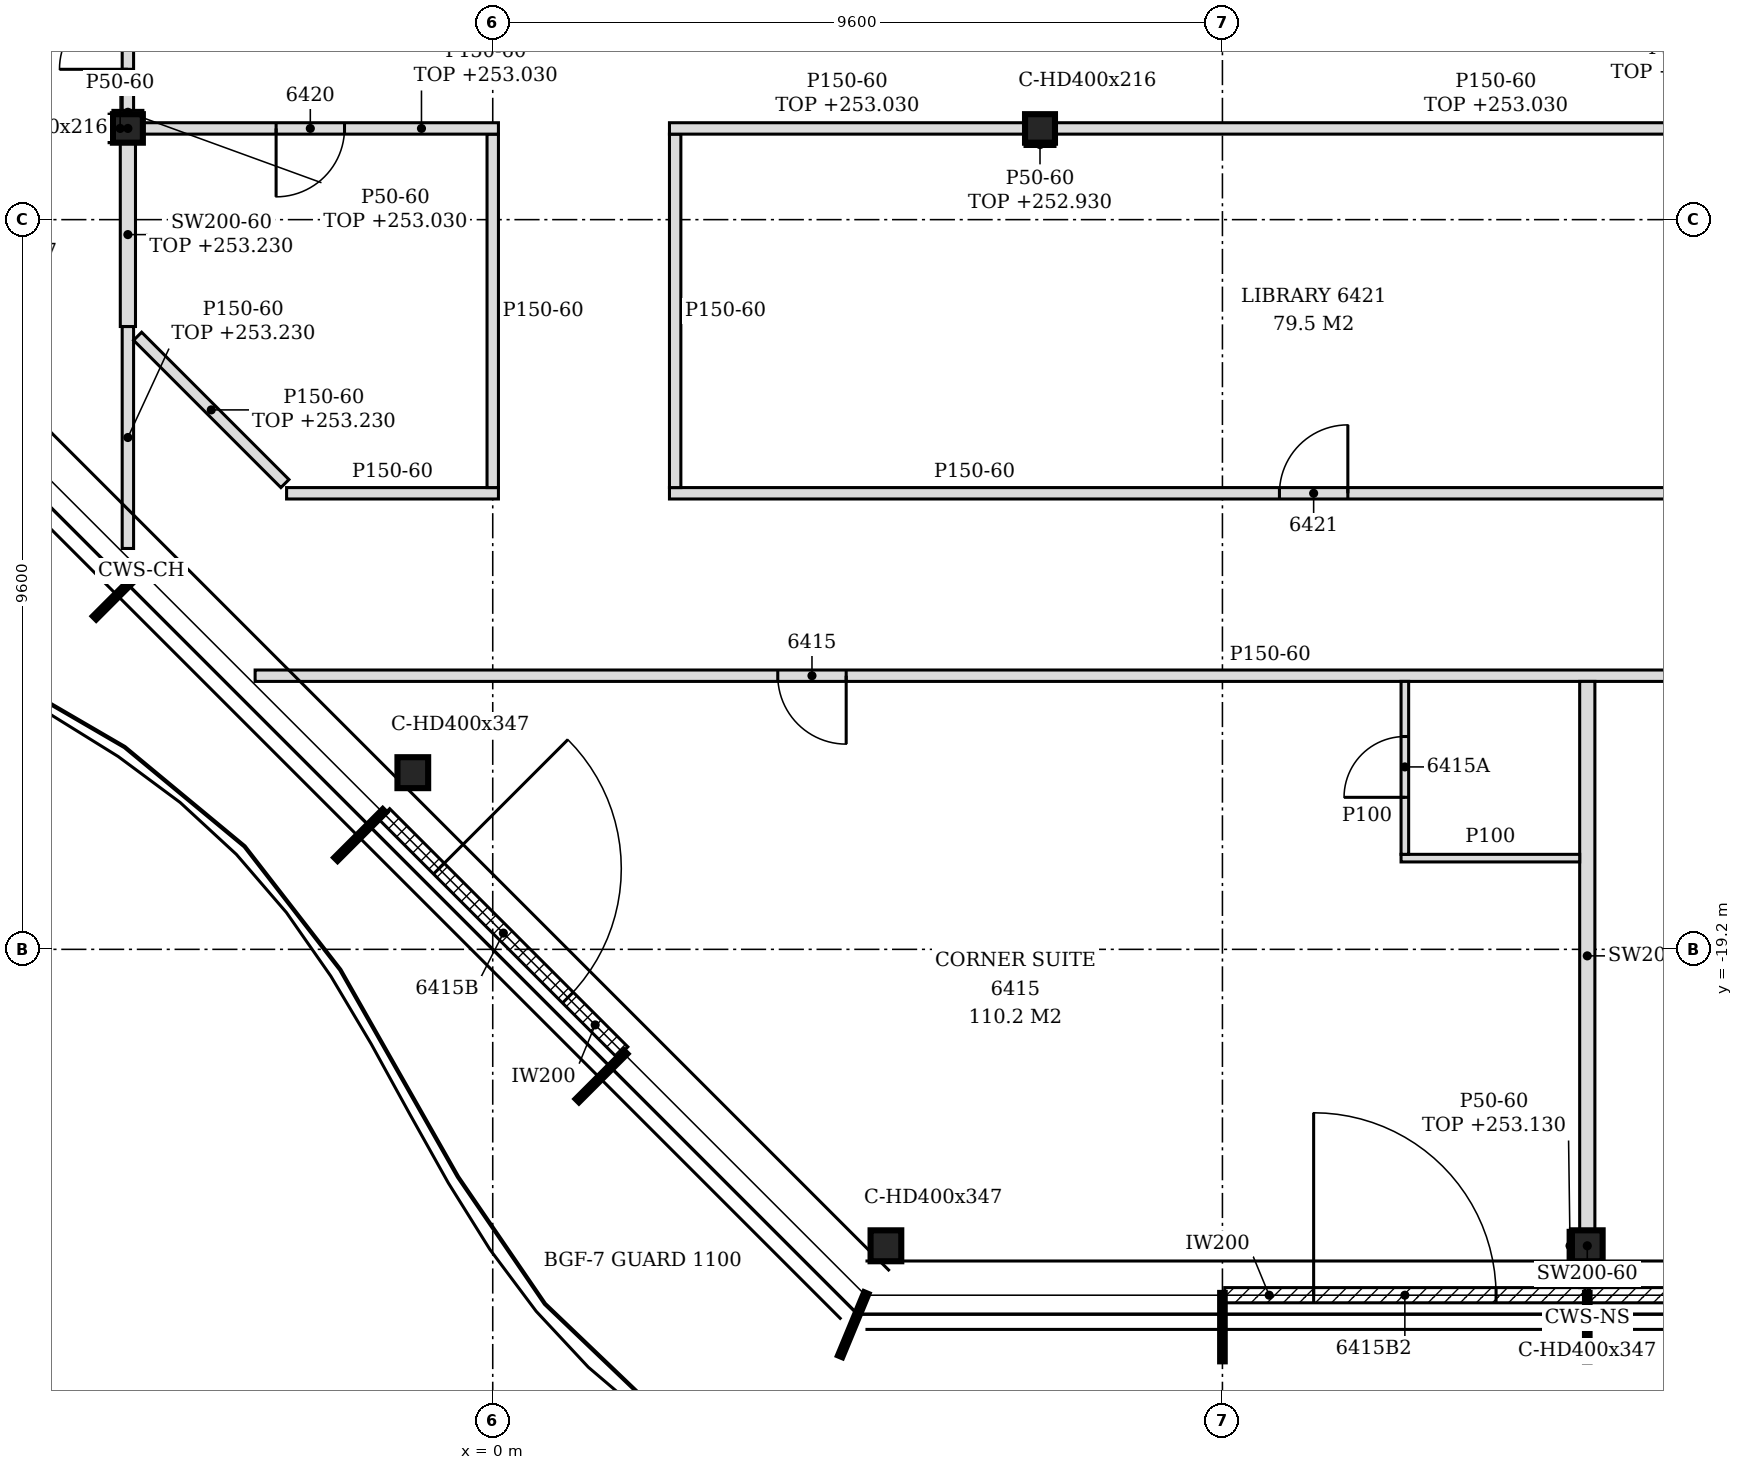
"""IFC4 building model, lengths in metres.
Left out: names, types, materials, properties, quantities, classifications, styles, units other than length and angle.
Written with IfcOpenShell. Run it as: python <this file> out.ifc"""

import sys

from ifc_helpers import new_model, si_unit, direction, frame, frame_2d, origin, origin_2d, place, context, subcontext, project, spatial, polyline, rectangle, i_section, outline, extrude, element, fill, save


model = new_model("IFC4")
c1 = context("Model", 3, precision=1e-05, world=origin(), true_north=direction((0.0, 1.0)))
c2 = subcontext(c1, "Body", "Model", "MODEL_VIEW")
j1 = project(units=[si_unit("LENGTHUNIT", "METRE"), si_unit("PLANEANGLEUNIT", "RADIAN")], contexts=[c1])
p1 = place(None, origin())
s1 = spatial("IfcSite", under=j1, at=p1, CompositionType="ELEMENT")
p2 = place(p1, origin())
s2 = spatial("IfcBuilding", under=s1, at=p2, CompositionType="ELEMENT")
p3 = place(p2, frame((0.0, 0.0, 250.2)))
s3 = spatial("IfcBuildingStorey", under=s2, at=p3, CompositionType="ELEMENT", Elevation=250.2)
for number, where, z_axis, x_axis in (
    (1, (5.173, -23.1, -0.15), (0.0, 0.0, 1.0), (1.0, 0.0, 0.0)),
    (2, (14.4, -23.1, -0.15), (0.0, 0.0, 1.0), (1.0, 0.0, 0.0)),
    (3, (-1.052, -16.876, -0.15), (0.0, 0.0, 1.0), (1.0, 0.0, 0.0)),
):
    element("IfcColumn", number, at=place(p3, frame(where, z_axis=z_axis, x_axis=x_axis)), inside=s3, PredefinedType="COLUMN", context=c2, shape_type="SweptSolid", body=[
        extrude(i_section(OverallWidth=0.404, OverallDepth=0.407, WebThickness=0.027, FlangeThickness=0.044, FilletRadius=0.015, at=origin_2d()), origin(), (0.0, 0.0, 1.0), 3.6),
    ])
for number, where, z_axis, x_axis in (
    (4, (-4.8, -8.4, -0.15), (0.0, 0.0, 1.0), (1.0, 0.0, 0.0)),
    (5, (7.2, -8.4, -0.15), (0.0, 0.0, 1.0), (1.0, 0.0, 0.0)),
):
    element("IfcColumn", number, at=place(p3, frame(where, z_axis=z_axis, x_axis=x_axis)), inside=s3, PredefinedType="COLUMN", context=c2, shape_type="SweptSolid", body=[
        extrude(i_section(OverallWidth=0.394, OverallDepth=0.375, WebThickness=0.017, FlangeThickness=0.028, FilletRadius=0.015, at=origin_2d()), origin(), (0.0, 0.0, 1.0), 3.6),
    ])
p4 = place(p3, frame((9.63, -23.75, 0.0), z_axis=(0.0, 0.0, 1.0), x_axis=(1.0, 0.0, 0.0)))
e6 = element("IfcWall", 6, at=p4, inside=s3, PredefinedType="NOTDEFINED", context=c2, shape_type="SweptSolid", body=[
    extrude(rectangle(XDim=4.74, YDim=0.2, at=frame_2d((2.37, 0.0))), origin(), (0.0, 0.0, 1.0), 3.45),
])
p5 = place(p4, frame((1.17, 0.0, 0.0)))
e7 = element("IfcOpeningElement", 7, at=p5, cuts=e6, PredefinedType="OPENING", context=c2, shape_type="SweptSolid", body=[
    extrude(rectangle(XDim=2.4, YDim=2.4, at=frame_2d((1.2, 1.2))), frame((0.0, 0.11, 0.0), z_axis=(0.0, -1.0, 0.0), x_axis=(1.0, 0.0, 0.0)), (0.0, 0.0, 1.0), 0.22),
])
p6 = place(p3, frame((14.43, -23.75, 0.0), z_axis=(0.0, 0.0, 1.0), x_axis=(1.0, 0.0, 0.0)))
e8 = element("IfcWall", 8, at=p6, inside=s3, PredefinedType="NOTDEFINED", context=c2, shape_type="SweptSolid", body=[
    extrude(rectangle(XDim=4.74, YDim=0.2, at=frame_2d((2.37, 0.0))), origin(), (0.0, 0.0, 1.0), 3.45),
])
p7 = place(p6, frame((1.17, 0.0, 0.0)))
e9 = element("IfcOpeningElement", 9, at=p7, cuts=e8, PredefinedType="OPENING", context=c2, shape_type="SweptSolid", body=[
    extrude(rectangle(XDim=2.4, YDim=2.4, at=frame_2d((1.2, 1.2))), frame((0.0, 0.11, 0.0), z_axis=(0.0, -1.0, 0.0), x_axis=(1.0, 0.0, 0.0)), (0.0, 0.0, 1.0), 0.22),
])
p8 = place(p3, frame((-1.427, -17.42, 0.0), z_axis=(0.0, 0.0, 1.0), x_axis=(0.707106781187, -0.707106781187, 0.0)))
e10 = element("IfcWall", 10, at=p8, inside=s3, PredefinedType="NOTDEFINED", context=c2, shape_type="SweptSolid", body=[
    extrude(rectangle(XDim=4.431, YDim=0.2, at=frame_2d((2.216, 0.0))), origin(), (0.0, 0.0, 1.0), 3.45),
])
p9 = place(p8, frame((1.015, 0.0, 0.0)))
e11 = element("IfcOpeningElement", 11, at=p9, cuts=e10, PredefinedType="OPENING", context=c2, shape_type="SweptSolid", body=[
    extrude(rectangle(XDim=2.4, YDim=2.4, at=frame_2d((1.2, 1.2))), frame((0.0, 0.11, 0.0), z_axis=(0.0, -1.0, 0.0), x_axis=(1.0, 0.0, 0.0)), (0.0, 0.0, 1.0), 0.22),
])
p10 = place(p3, frame((14.4, -23.65, 0.0), z_axis=(0.0, 0.0, 1.0), x_axis=(0.0, 1.0, 0.0)))
e12 = element("IfcWall", 12, at=p10, inside=s3, PredefinedType="PARTITIONING", context=c2, shape_type="SweptSolid", body=[
    extrude(rectangle(XDim=0.346, YDim=0.2, at=frame_2d((0.173, 0.0))), origin(), (0.0, 0.0, 1.0), 3.45),
])
p11 = place(p3, frame((14.4, -22.896, 0.0), z_axis=(0.0, 0.0, 1.0), x_axis=(0.0, 1.0, 0.0)))
e13 = element("IfcWall", 13, at=p11, inside=s3, PredefinedType="PARTITIONING", context=c2, shape_type="SweptSolid", body=[
    extrude(outline(polyline([(0.0, 0.0), (7.221, 0.0), (7.221, 3.45), (3.802, 3.45), (3.8, 2.88), (3.592, 2.88), (3.59, 3.45), (0.0, 3.45), (0.0, 0.0)])), frame((0.0, 0.1, 0.0), z_axis=(0.0, -1.0, 0.0), x_axis=(1.0, 0.0, 0.0)), (0.0, 0.0, 1.0), 0.2),
])
p12 = place(p3, frame((11.95, -18.0, 0.0), z_axis=(0.0, 0.0, 1.0), x_axis=(1.0, 0.0, 0.0)))
e14 = element("IfcWall", 14, at=p12, inside=s3, PredefinedType="PARTITIONING", context=c2, shape_type="SweptSolid", body=[
    extrude(rectangle(XDim=2.35, YDim=0.1, at=frame_2d((1.175, 0.0))), origin(), (0.0, 0.0, 1.0), 3.45),
])
p13 = place(p3, frame((12.0, -17.95, 0.0), z_axis=(0.0, 0.0, 1.0), x_axis=(0.0, 1.0, 0.0)))
e15 = element("IfcWall", 15, at=p13, inside=s3, PredefinedType="PARTITIONING", context=c2, shape_type="SweptSolid", body=[
    extrude(rectangle(XDim=2.275, YDim=0.1, at=frame_2d((1.137, 0.0))), origin(), (0.0, 0.0, 1.0), 3.45),
])
p14 = place(p13, frame((0.75, 0.0, 0.0)))
e16 = element("IfcOpeningElement", 16, at=p14, cuts=e15, PredefinedType="OPENING", context=c2, shape_type="SweptSolid", body=[
    extrude(rectangle(XDim=0.8, YDim=2.1, at=frame_2d((0.4, 1.05))), frame((0.0, 0.06, 0.0), z_axis=(0.0, -1.0, 0.0), x_axis=(1.0, 0.0, 0.0)), (0.0, 0.0, 1.0), 0.12),
])
p15 = place(p3, frame((-3.126, -15.6, 0.0), z_axis=(0.0, 0.0, 1.0), x_axis=(1.0, 0.0, 0.0)))
e17 = element("IfcWall", 17, at=p15, inside=s3, PredefinedType="PARTITIONING", context=c2, shape_type="SweptSolid", body=[
    extrude(outline(polyline([(0.0, 0.0), (23.753, 0.0), (23.753, 3.45), (22.476, 3.45), (22.474, 2.73), (22.176, 2.73), (22.174, 3.45), (10.476, 3.45), (10.474, 2.73), (10.176, 2.73), (10.174, 3.45), (1.369, 3.45), (1.367, 2.63), (0.229, 2.63), (0.227, 3.45), (0.0, 3.45), (0.0, 0.0)])), frame((0.0, 0.075, 0.0), z_axis=(0.0, -1.0, 0.0), x_axis=(1.0, 0.0, 0.0)), (0.0, 0.0, 1.0), 0.15),
])
p16 = place(p15, frame((18.937, 0.0, 0.0)))
e18 = element("IfcOpeningElement", 18, at=p16, cuts=e17, PredefinedType="OPENING", context=c2, shape_type="SweptSolid", body=[
    extrude(rectangle(XDim=0.9, YDim=2.1, at=frame_2d((0.45, 1.05))), frame((0.0, 0.085, 0.0), z_axis=(0.0, -1.0, 0.0), x_axis=(1.0, 0.0, 0.0)), (0.0, 0.0, 1.0), 0.17),
])
p17 = place(p15, frame((6.876, 0.0, 0.0)))
e19 = element("IfcOpeningElement", 19, at=p17, cuts=e17, PredefinedType="OPENING", context=c2, shape_type="SweptSolid", body=[
    extrude(rectangle(XDim=0.9, YDim=2.1, at=frame_2d((0.45, 1.05))), frame((0.0, 0.085, 0.0), z_axis=(0.0, -1.0, 0.0), x_axis=(1.0, 0.0, 0.0)), (0.0, 0.0, 1.0), 0.17),
])
p18 = place(p3, frame((-4.8, -13.926, 0.0), z_axis=(0.0, 0.0, 1.0), x_axis=(0.0, 1.0, 0.0)))
e20 = element("IfcWall", 20, at=p18, inside=s3, PredefinedType="PARTITIONING", context=c2, shape_type="SweptSolid", body=[
    extrude(outline(polyline([(0.0, 0.0), (2.92, 0.0), (2.92, 3.03), (1.369, 3.03), (1.367, 2.63), (0.229, 2.63), (0.227, 3.03), (0.0, 3.03), (0.0, 0.0)])), frame((0.0, 0.075, 0.0), z_axis=(0.0, -1.0, 0.0), x_axis=(1.0, 0.0, 0.0)), (0.0, 0.0, 1.0), 0.15),
])
p19 = place(p3, frame((-2.712, -13.2, 0.0), z_axis=(0.0, 0.0, 1.0), x_axis=(1.0, 0.0, 0.0)))
e21 = element("IfcWall", 21, at=p19, inside=s3, PredefinedType="PARTITIONING", context=c2, shape_type="SweptSolid", body=[
    extrude(rectangle(XDim=2.787, YDim=0.15, at=frame_2d((1.394, 0.0))), origin(), (0.0, 0.0, 1.0), 3.45),
])
p20 = place(p3, frame((2.325, -13.2, 0.0), z_axis=(0.0, 0.0, 1.0), x_axis=(1.0, 0.0, 0.0)))
e22 = element("IfcWall", 22, at=p20, inside=s3, PredefinedType="PARTITIONING", context=c2, shape_type="SweptSolid", body=[
    extrude(outline(polyline([(0.0, 0.0), (16.95, 0.0), (16.95, 2.73), (16.725, 2.73), (16.723, 3.45), (5.025, 3.45), (5.023, 2.73), (4.725, 2.73), (4.723, 3.45), (0.0, 3.45), (0.0, 0.0)])), frame((0.0, 0.075, 0.0), z_axis=(0.0, -1.0, 0.0), x_axis=(1.0, 0.0, 0.0)), (0.0, 0.0, 1.0), 0.15),
])
p21 = place(p20, frame((8.025, 0.0, 0.0)))
e23 = element("IfcOpeningElement", 23, at=p21, cuts=e22, PredefinedType="OPENING", context=c2, shape_type="SweptSolid", body=[
    extrude(rectangle(XDim=0.9, YDim=2.1, at=frame_2d((0.45, 1.05))), frame((0.0, 0.085, 0.0), z_axis=(0.0, -1.0, 0.0), x_axis=(1.0, 0.0, 0.0)), (0.0, 0.0, 1.0), 0.17),
])
p22 = place(p3, frame((-2.734, -13.072, 0.0), z_axis=(0.0, 0.0, 1.0), x_axis=(-0.707151316332, 0.707062243236, 0.0)))
e24 = element("IfcWall", 24, at=p22, inside=s3, PredefinedType="PARTITIONING", context=c2, shape_type="SweptSolid", body=[
    extrude(rectangle(XDim=2.741, YDim=0.15, at=frame_2d((1.371, 0.0))), origin(), (0.0, 0.0, 1.0), 3.03),
])
for number, where, z_axis, x_axis in (
    (25, (0.0, -13.125, 0.0), (0.0, 0.0, 1.0), (0.0, 1.0, 0.0)),
    (26, (2.4, -13.125, 0.0), (0.0, 0.0, 1.0), (0.0, 1.0, 0.0)),
):
    element("IfcWall", number, at=place(p3, frame(where, z_axis=z_axis, x_axis=x_axis)), inside=s3, PredefinedType="PARTITIONING", context=c2, shape_type="SweptSolid", body=[
        extrude(outline(polyline([(0.0, 0.0), (4.65, 0.0), (4.65, 2.83), (4.575, 2.83), (4.573, 3.45), (0.0, 3.45), (0.0, 0.0)])), frame((0.0, 0.075, 0.0), z_axis=(0.0, -1.0, 0.0), x_axis=(1.0, 0.0, 0.0)), (0.0, 0.0, 1.0), 0.15),
    ])
p23 = place(p3, frame((-4.8, -11.006, 0.0), z_axis=(0.0, 0.0, 1.0), x_axis=(0.0, 1.0, 0.0)))
e27 = element("IfcWall", 27, at=p23, inside=s3, PredefinedType="PARTITIONING", context=c2, shape_type="SweptSolid", body=[
    extrude(rectangle(XDim=2.419, YDim=0.2, at=frame_2d((1.209, 0.0))), origin(), (0.0, 0.0, 1.0), 3.03),
])
p24 = place(p3, frame((-4.603, -8.4, 0.0), z_axis=(0.0, 0.0, 1.0), x_axis=(1.0, 0.0, 0.0)))
e28 = element("IfcWall", 28, at=p24, inside=s3, PredefinedType="PARTITIONING", context=c2, shape_type="SweptSolid", body=[
    extrude(rectangle(XDim=4.678, YDim=0.15, at=frame_2d((2.339, 0.0))), origin(), (0.0, 0.0, 1.0), 2.83),
])
p25 = place(p24, frame((1.753, 0.0, 0.0)))
e29 = element("IfcOpeningElement", 29, at=p25, cuts=e28, PredefinedType="OPENING", context=c2, shape_type="SweptSolid", body=[
    extrude(rectangle(XDim=0.9, YDim=2.1, at=frame_2d((0.45, 1.05))), frame((0.0, 0.085, 0.0), z_axis=(0.0, -1.0, 0.0), x_axis=(1.0, 0.0, 0.0)), (0.0, 0.0, 1.0), 0.17),
])
p26 = place(p3, frame((2.325, -8.4, 0.0), z_axis=(0.0, 0.0, 1.0), x_axis=(1.0, 0.0, 0.0)))
e30 = element("IfcWall", 30, at=p26, inside=s3, PredefinedType="PARTITIONING", context=c2, shape_type="SweptSolid", body=[
    extrude(rectangle(XDim=4.678, YDim=0.15, at=frame_2d((2.339, 0.0))), origin(), (0.0, 0.0, 1.0), 2.83),
])
p27 = place(p3, frame((7.397, -8.4, 0.0), z_axis=(0.0, 0.0, 1.0), x_axis=(1.0, 0.0, 0.0)))
e31 = element("IfcWall", 31, at=p27, inside=s3, PredefinedType="PARTITIONING", context=c2, shape_type="SweptSolid", body=[
    extrude(rectangle(XDim=11.606, YDim=0.15, at=frame_2d((5.803, 0.0))), origin(), (0.0, 0.0, 1.0), 2.83),
])
p28 = place(p3, frame((-4.8, -8.212, 0.0), z_axis=(0.0, 0.0, 1.0), x_axis=(0.0, 1.0, 0.0)))
e32 = element("IfcWall", 32, at=p28, inside=s3, PredefinedType="PARTITIONING", context=c2, shape_type="SweptSolid", body=[
    extrude(rectangle(XDim=10.425, YDim=0.15, at=frame_2d((5.212, 0.0))), origin(), (0.0, 0.0, 1.0), 2.83),
])
p29 = place(p28, frame((7.163, 0.0, 0.0)))
e33 = element("IfcOpeningElement", 33, at=p29, cuts=e32, PredefinedType="OPENING", context=c2, shape_type="SweptSolid", body=[
    extrude(rectangle(XDim=0.9, YDim=2.1, at=frame_2d((0.45, 1.05))), frame((0.0, 0.085, 0.0), z_axis=(0.0, -1.0, 0.0), x_axis=(1.0, 0.0, 0.0)), (0.0, 0.0, 1.0), 0.17),
])
p30 = place(p28, frame((0.591, 0.0, 0.0)))
e34 = element("IfcOpeningElement", 34, at=p30, cuts=e32, PredefinedType="OPENING", context=c2, shape_type="SweptSolid", body=[
    extrude(rectangle(XDim=0.9, YDim=2.1, at=frame_2d((0.45, 1.05))), frame((0.0, 0.085, 0.0), z_axis=(0.0, -1.0, 0.0), x_axis=(1.0, 0.0, 0.0)), (0.0, 0.0, 1.0), 0.17),
])
p31 = place(p3, frame((14.173, -23.303, 0.0), z_axis=(0.0, 0.0, 1.0), x_axis=(0.0, 1.0, 0.0)))
e35 = element("IfcWall", 35, at=p31, inside=s3, PredefinedType="PARTITIONING", context=c2, shape_type="SweptSolid", body=[
    extrude(rectangle(XDim=0.407, YDim=0.05, at=frame_2d((0.204, 0.0))), origin(), (0.0, 0.0, 1.0), 2.93),
])
p32 = place(p3, frame((-5.022, -8.587, 0.0), z_axis=(0.0, 0.0, 1.0), x_axis=(0.0, 1.0, 0.0)))
e36 = element("IfcWall", 36, at=p32, inside=s3, PredefinedType="PARTITIONING", context=c2, shape_type="SweptSolid", body=[
    extrude(rectangle(XDim=0.375, YDim=0.05, at=frame_2d((0.188, 0.0))), origin(), (0.0, 0.0, 1.0), 3.45),
])
p33 = place(p3, frame((-4.997, -8.188, 0.0), z_axis=(0.0, 0.0, 1.0), x_axis=(1.0, 0.0, 0.0)))
e37 = element("IfcWall", 37, at=p33, inside=s3, PredefinedType="PARTITIONING", context=c2, shape_type="SweptSolid", body=[
    extrude(rectangle(XDim=0.394, YDim=0.05, at=frame_2d((0.197, 0.0))), origin(), (0.0, 0.0, 1.0), 2.83),
])
p34 = place(p3, frame((7.003, -8.613, 0.0), z_axis=(0.0, 0.0, 1.0), x_axis=(1.0, 0.0, 0.0)))
e38 = element("IfcWall", 38, at=p34, inside=s3, PredefinedType="PARTITIONING", context=c2, shape_type="SweptSolid", body=[
    extrude(rectangle(XDim=0.394, YDim=0.05, at=frame_2d((0.197, 0.0))), origin(), (0.0, 0.0, 1.0), 2.73),
])
p35 = place(p5, origin())
e39 = element("IfcDoor", 39, at=p35, inside=s3, OperationType="SINGLE_SWING_LEFT", PredefinedType="DOOR", context=c2, shape_type="SweptSolid", body=[
    extrude(rectangle(XDim=2.4, YDim=2.4, at=frame_2d((1.2, 1.2))), frame((0.0, 0.025, 0.0), z_axis=(0.0, -1.0, 0.0), x_axis=(1.0, 0.0, 0.0)), (0.0, 0.0, 1.0), 0.05),
])
fill(e7, e39)
p36 = place(p9, origin())
e40 = element("IfcDoor", 40, at=p36, inside=s3, OperationType="SINGLE_SWING_LEFT", PredefinedType="DOOR", context=c2, shape_type="SweptSolid", body=[
    extrude(rectangle(XDim=2.4, YDim=2.4, at=frame_2d((1.2, 1.2))), frame((0.0, 0.025, 0.0), z_axis=(0.0, -1.0, 0.0), x_axis=(1.0, 0.0, 0.0)), (0.0, 0.0, 1.0), 0.05),
])
fill(e11, e40)
p37 = place(p30, origin())
e41 = element("IfcDoor", 41, at=p37, inside=s3, OperationType="SINGLE_SWING_LEFT", PredefinedType="DOOR", context=c2, shape_type="SweptSolid", body=[
    extrude(rectangle(XDim=0.9, YDim=2.1, at=frame_2d((0.45, 1.05))), frame((0.0, 0.025, 0.0), z_axis=(0.0, -1.0, 0.0), x_axis=(1.0, 0.0, 0.0)), (0.0, 0.0, 1.0), 0.05),
])
fill(e34, e41)
p38 = place(p17, frame((0.9, 0.0, 0.0), z_axis=(0.0, 0.0, 1.0), x_axis=(-1.0, 0.0, 0.0)))
e42 = element("IfcDoor", 42, at=p38, inside=s3, OperationType="SINGLE_SWING_LEFT", PredefinedType="DOOR", context=c2, shape_type="SweptSolid", body=[
    extrude(rectangle(XDim=0.9, YDim=2.1, at=frame_2d((0.45, 1.05))), frame((0.0, 0.025, 0.0), z_axis=(0.0, -1.0, 0.0), x_axis=(1.0, 0.0, 0.0)), (0.0, 0.0, 1.0), 0.05),
])
fill(e19, e42)
p39 = place(p14, origin())
e43 = element("IfcDoor", 43, at=p39, inside=s3, OperationType="SINGLE_SWING_LEFT", PredefinedType="DOOR", context=c2, shape_type="SweptSolid", body=[
    extrude(rectangle(XDim=0.8, YDim=2.1, at=frame_2d((0.4, 1.05))), frame((0.0, 0.025, 0.0), z_axis=(0.0, -1.0, 0.0), x_axis=(1.0, 0.0, 0.0)), (0.0, 0.0, 1.0), 0.05),
])
fill(e16, e43)
p40 = place(p25, frame((0.9, 0.0, 0.0), z_axis=(0.0, 0.0, 1.0), x_axis=(-1.0, 0.0, 0.0)))
e44 = element("IfcDoor", 44, at=p40, inside=s3, OperationType="SINGLE_SWING_RIGHT", PredefinedType="DOOR", context=c2, shape_type="SweptSolid", body=[
    extrude(rectangle(XDim=0.9, YDim=2.1, at=frame_2d((0.45, 1.05))), frame((0.0, 0.025, 0.0), z_axis=(0.0, -1.0, 0.0), x_axis=(1.0, 0.0, 0.0)), (0.0, 0.0, 1.0), 0.05),
])
fill(e29, e44)
p41 = place(p21, origin())
e45 = element("IfcDoor", 45, at=p41, inside=s3, OperationType="SINGLE_SWING_RIGHT", PredefinedType="DOOR", context=c2, shape_type="SweptSolid", body=[
    extrude(rectangle(XDim=0.9, YDim=2.1, at=frame_2d((0.45, 1.05))), frame((0.0, 0.025, 0.0), z_axis=(0.0, -1.0, 0.0), x_axis=(1.0, 0.0, 0.0)), (0.0, 0.0, 1.0), 0.05),
])
fill(e23, e45)
save(model, sys.argv[1])
